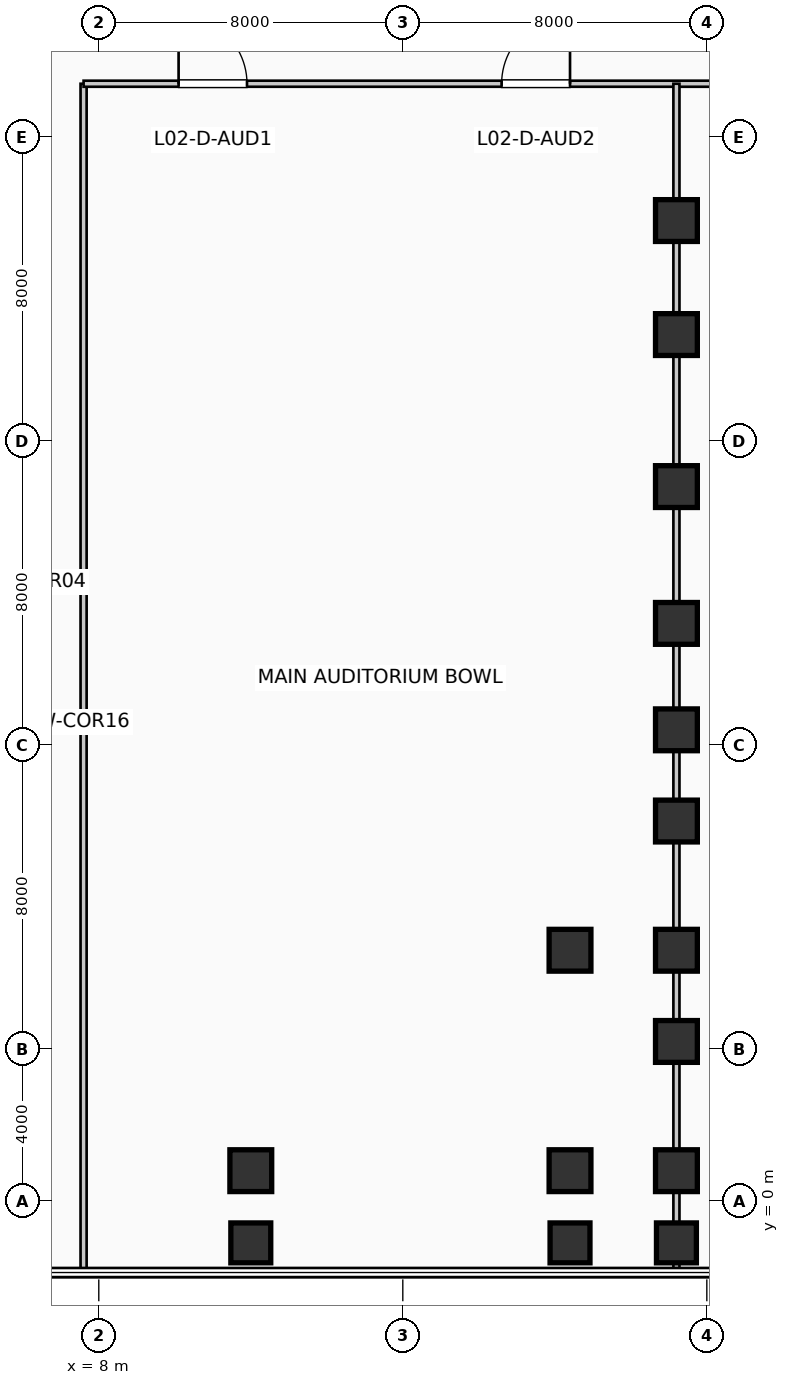
"""IFC4 building model, lengths in metres.
Left out: names, types, materials, properties, quantities, classifications, styles, units other than length and angle.
Written with IfcOpenShell. Run it as: python <this file> out.ifc"""

import sys

from ifc_helpers import new_model, si_unit, direction, frame, frame_2d, origin, origin_2d, place, context, subcontext, project, spatial, rectangle, extrude, element, fill, save


model = new_model("IFC4")
c1 = context("Model", 3, precision=1e-05, world=origin(), true_north=direction((0.0, 1.0)))
c2 = subcontext(c1, "Body", "Model", "MODEL_VIEW")
j1 = project(units=[si_unit("LENGTHUNIT", "METRE"), si_unit("PLANEANGLEUNIT", "RADIAN")], contexts=[c1])
p1 = place(None, origin())
s1 = spatial("IfcSite", under=j1, at=p1, CompositionType="ELEMENT")
p2 = place(p1, origin())
s2 = spatial("IfcBuilding", under=s1, at=p2, CompositionType="ELEMENT")
p3 = place(p2, frame((0.0, 0.0, 11.22)))
s3 = spatial("IfcBuildingStorey", under=s2, at=p3, CompositionType="ELEMENT", Elevation=11.22)
p4 = place(p3, frame((12.0, -1.1, 0.0), z_axis=(0.0, 0.0, 1.0), x_axis=(1.0, 0.0, 0.0)))
e1 = element("IfcColumn", 1, at=p4, inside=s3, PredefinedType="COLUMN", context=c2, shape_type="SweptSolid", body=[
    extrude(rectangle(XDim=1.05, YDim=1.05, at=origin_2d()), origin(), (0.0, 0.0, 1.0), 5.28),
])
p5 = place(p3, frame((12.0, 0.8, 0.0), z_axis=(0.0, 0.0, 1.0), x_axis=(1.0, 0.0, 0.0)))
e2 = element("IfcColumn", 2, at=p5, inside=s3, PredefinedType="COLUMN", context=c2, shape_type="SweptSolid", body=[
    extrude(rectangle(XDim=1.1, YDim=1.1, at=origin_2d()), origin(), (0.0, 0.0, 1.0), 5.28),
])
p6 = place(p3, frame((20.4, -1.1, 0.0), z_axis=(0.0, 0.0, 1.0), x_axis=(1.0, 0.0, 0.0)))
e3 = element("IfcColumn", 3, at=p6, inside=s3, PredefinedType="COLUMN", context=c2, shape_type="SweptSolid", body=[
    extrude(rectangle(XDim=1.05, YDim=1.05, at=origin_2d()), origin(), (0.0, 0.0, 1.0), 5.28),
])
for number, where, z_axis, x_axis in (
    (4, (20.4, 0.8, 0.0), (0.0, 0.0, 1.0), (1.0, 0.0, 0.0)),
    (5, (20.4, 6.6, 0.0), (0.0, 0.0, 1.0), (1.0, 0.0, 0.0)),
):
    element("IfcColumn", number, at=place(p3, frame(where, z_axis=z_axis, x_axis=x_axis)), inside=s3, PredefinedType="COLUMN", context=c2, shape_type="SweptSolid", body=[
        extrude(rectangle(XDim=1.1, YDim=1.1, at=origin_2d()), origin(), (0.0, 0.0, 1.0), 5.28),
    ])
p7 = place(p3, frame((23.2, -1.1, 0.0), z_axis=(0.0, 0.0, 1.0), x_axis=(1.0, 0.0, 0.0)))
e6 = element("IfcColumn", 6, at=p7, inside=s3, PredefinedType="COLUMN", context=c2, shape_type="SweptSolid", body=[
    extrude(rectangle(XDim=1.05, YDim=1.05, at=origin_2d()), origin(), (0.0, 0.0, 1.0), 5.28),
])
for number, where, z_axis, x_axis in (
    (7, (23.2, 0.8, 0.0), (0.0, 0.0, 1.0), (1.0, 0.0, 0.0)),
    (8, (23.2, 4.2, 0.0), (0.0, 0.0, 1.0), (1.0, 0.0, 0.0)),
    (9, (23.2, 6.6, 0.0), (0.0, 0.0, 1.0), (1.0, 0.0, 0.0)),
    (10, (23.2, 10.0, 0.0), (0.0, 0.0, 1.0), (1.0, 0.0, 0.0)),
    (11, (23.2, 12.4, 0.0), (0.0, 0.0, 1.0), (1.0, 0.0, 0.0)),
    (12, (23.2, 15.2, 0.0), (0.0, 0.0, 1.0), (1.0, 0.0, 0.0)),
    (13, (23.2, 18.8, 0.0), (0.0, 0.0, 1.0), (1.0, 0.0, 0.0)),
    (14, (23.2, 22.8, 0.0), (0.0, 0.0, 1.0), (1.0, 0.0, 0.0)),
    (15, (23.2, 25.8, 0.0), (0.0, 0.0, 1.0), (1.0, 0.0, 0.0)),
):
    element("IfcColumn", number, at=place(p3, frame(where, z_axis=z_axis, x_axis=x_axis)), inside=s3, PredefinedType="COLUMN", context=c2, shape_type="SweptSolid", body=[
        extrude(rectangle(XDim=1.1, YDim=1.1, at=origin_2d()), origin(), (0.0, 0.0, 1.0), 5.28),
    ])
p8 = place(p3, frame((7.6, -1.81, 0.0), z_axis=(0.0, 0.0, 1.0), x_axis=(0.0, 1.0, 0.0)))
e16 = element("IfcWall", 16, at=p8, inside=s3, PredefinedType="PARTITIONING", context=c2, shape_type="SweptSolid", body=[
    extrude(rectangle(XDim=31.21, YDim=0.16, at=frame_2d((15.605, 0.0))), origin(), (0.0, 0.0, 1.0), 4.96),
])
p9 = place(p3, frame((7.6, 29.4, 0.0), z_axis=(0.0, 0.0, 1.0), x_axis=(1.0, 0.0, 0.0)))
e17 = element("IfcWall", 17, at=p9, inside=s3, PredefinedType="PARTITIONING", context=c2, shape_type="SweptSolid", body=[
    extrude(rectangle(XDim=43.75, YDim=0.16, at=frame_2d((21.875, 0.0))), origin(), (0.0, 0.0, 1.0), 4.615),
])
p10 = place(p9, frame((2.5, 0.0, 0.0)))
e18 = element("IfcOpeningElement", 18, at=p10, cuts=e17, PredefinedType="OPENING", context=c2, shape_type="SweptSolid", body=[
    extrude(rectangle(XDim=1.8, YDim=2.3, at=frame_2d((0.9, 1.15))), frame((0.0, 0.09, 0.0), z_axis=(0.0, -1.0, 0.0), x_axis=(1.0, 0.0, 0.0)), (0.0, 0.0, 1.0), 0.18),
])
p11 = place(p9, frame((11.0, 0.0, 0.0)))
e19 = element("IfcOpeningElement", 19, at=p11, cuts=e17, PredefinedType="OPENING", context=c2, shape_type="SweptSolid", body=[
    extrude(rectangle(XDim=1.8, YDim=2.3, at=frame_2d((0.9, 1.15))), frame((0.0, 0.09, 0.0), z_axis=(0.0, -1.0, 0.0), x_axis=(1.0, 0.0, 0.0)), (0.0, 0.0, 1.0), 0.18),
])
p12 = place(p9, frame((18.0, 0.0, 0.0)))
e20 = element("IfcOpeningElement", 20, at=p12, cuts=e17, PredefinedType="OPENING", context=c2, shape_type="SweptSolid", body=[
    extrude(rectangle(XDim=1.8, YDim=2.3, at=frame_2d((0.9, 1.15))), frame((0.0, 0.09, 0.0), z_axis=(0.0, -1.0, 0.0), x_axis=(1.0, 0.0, 0.0)), (0.0, 0.0, 1.0), 0.18),
])
p13 = place(p9, frame((26.5, 0.0, 0.0)))
e21 = element("IfcOpeningElement", 21, at=p13, cuts=e17, PredefinedType="OPENING", context=c2, shape_type="SweptSolid", body=[
    extrude(rectangle(XDim=0.95, YDim=2.15, at=frame_2d((0.475, 1.075))), frame((0.0, 0.09, 0.0), z_axis=(0.0, -1.0, 0.0), x_axis=(1.0, 0.0, 0.0)), (0.0, 0.0, 1.0), 0.18),
])
p14 = place(p9, frame((35.0, 0.0, 0.0)))
e22 = element("IfcOpeningElement", 22, at=p14, cuts=e17, PredefinedType="OPENING", context=c2, shape_type="SweptSolid", body=[
    extrude(rectangle(XDim=0.95, YDim=2.15, at=frame_2d((0.475, 1.075))), frame((0.0, 0.09, 0.0), z_axis=(0.0, -1.0, 0.0), x_axis=(1.0, 0.0, 0.0)), (0.0, 0.0, 1.0), 0.18),
])
p15 = place(p3, frame((23.2, -1.81, 0.0), z_axis=(0.0, 0.0, 1.0), x_axis=(0.0, 1.0, 0.0)))
e23 = element("IfcWall", 23, at=p15, inside=s3, PredefinedType="PARTITIONING", context=c2, shape_type="SweptSolid", body=[
    extrude(rectangle(XDim=31.21, YDim=0.16, at=frame_2d((15.605, 0.0))), origin(), (0.0, 0.0, 1.0), 4.145),
])
p16 = place(p10, origin())
e24 = element("IfcDoor", 24, at=p16, inside=s3, OperationType="SINGLE_SWING_LEFT", PredefinedType="DOOR", context=c2, shape_type="SweptSolid", body=[
    extrude(rectangle(XDim=1.8, YDim=2.3, at=frame_2d((0.9, 1.15))), frame((0.0, 0.025, 0.0), z_axis=(0.0, -1.0, 0.0), x_axis=(1.0, 0.0, 0.0)), (0.0, 0.0, 1.0), 0.05),
])
fill(e18, e24)
p17 = place(p11, origin())
e25 = element("IfcDoor", 25, at=p17, inside=s3, OperationType="SINGLE_SWING_RIGHT", PredefinedType="DOOR", context=c2, shape_type="SweptSolid", body=[
    extrude(rectangle(XDim=1.8, YDim=2.3, at=frame_2d((0.9, 1.15))), frame((0.0, 0.025, 0.0), z_axis=(0.0, -1.0, 0.0), x_axis=(1.0, 0.0, 0.0)), (0.0, 0.0, 1.0), 0.05),
])
fill(e19, e25)
save(model, sys.argv[1])
